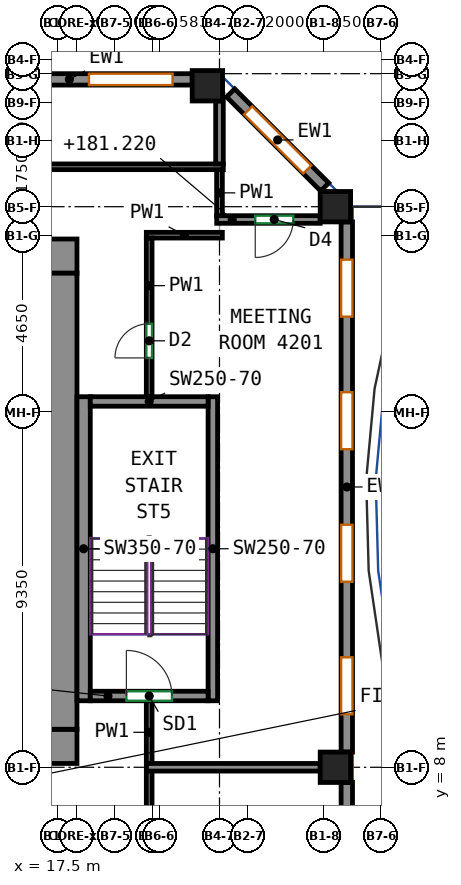
"""IFC4 building model, lengths in metres.
Left out: names, types, materials, properties, quantities, classifications, styles, units other than length and angle.
Written with IfcOpenShell. Run it as: python <this file> out.ifc"""

import sys

from ifc_helpers import new_model, si_unit, direction, frame, frame_2d, origin, origin_2d, place, context, subcontext, project, spatial, rectangle, extrude, source, transform, mapped, element, fill, save


model = new_model("IFC4")
c1 = context("Model", 3, precision=1e-05, world=origin(), true_north=direction((0.0, 1.0)))
c2 = subcontext(c1, "Body", "Model", "MODEL_VIEW")
j1 = project(units=[si_unit("LENGTHUNIT", "METRE"), si_unit("PLANEANGLEUNIT", "RADIAN")], contexts=[c1])
p1 = place(None, origin())
s1 = spatial("IfcSite", under=j1, at=p1, CompositionType="ELEMENT")
p2 = place(p1, origin())
s2 = spatial("IfcBuilding", under=s1, at=p2, CompositionType="ELEMENT")
p3 = place(p2, frame((0.0, 0.0, 178.7)))
s3 = spatial("IfcBuildingStorey", under=s2, at=p3, CompositionType="ELEMENT", Elevation=178.7)
m1 = source(origin(), c2, "Body", "SweptSolid", [
    extrude(rectangle(XDim=0.8, YDim=0.8, at=origin_2d()), origin(), (0.0, 0.0, 1.0), 3.12),
])
for number, where, z_axis, x_axis in (
    (1, (21.432, 25.932, 0.0), (0.0, 0.0, 1.0), (1.0, 0.0, 0.0)),
    (2, (24.8, 8.0, 0.0), (0.0, 0.0, 1.0), (1.0, 0.0, 0.0)),
    (3, (24.8, 22.75, 0.0), (0.0, 0.0, 1.0), (1.0, 0.0, 0.0)),
):
    element("IfcColumn", number, at=place(p3, frame(where, z_axis=z_axis, x_axis=x_axis)), inside=s3, PredefinedType="COLUMN", context=c2, shape_type="MappedRepresentation", body=[
        mapped(m1, transform((0.0, 0.0, 0.0))),
    ])
m2 = source(origin(), c2, "Body", "SweptSolid", [
    extrude(rectangle(XDim=5.53, YDim=0.9, at=frame_2d((2.765, 0.0))), origin(), (0.0, 0.0, 1.0), 3.12),
])
p4 = place(p3, frame((12.47, 8.55, 0.0), z_axis=(0.0, 0.0, 1.0), x_axis=(1.0, 0.0, 0.0)))
e4 = element("IfcWall", 4, at=p4, inside=s3, PredefinedType="SHEAR", context=c2, shape_type="MappedRepresentation", body=[
    mapped(m2, transform((0.0, 0.0, 0.0))),
])
p5 = place(p4, frame((2.18, 0.0, 0.0)))
e5 = element("IfcOpeningElement", 5, at=p5, cuts=e4, PredefinedType="OPENING", context=c2, shape_type="SweptSolid", body=[
    extrude(rectangle(XDim=1.2, YDim=2.1, at=frame_2d((0.6, 1.05))), frame((0.0, 0.46, 0.0), z_axis=(0.0, -1.0, 0.0), x_axis=(1.0, 0.0, 0.0)), (0.0, 0.0, 1.0), 0.92),
])
m3 = source(origin(), c2, "Body", "SweptSolid", [
    extrude(rectangle(XDim=33.9, YDim=0.9, at=frame_2d((16.95, 0.0))), origin(), (0.0, 0.0, 1.0), 3.12),
])
p6 = place(p3, frame((-15.9, 21.45, 0.0), z_axis=(0.0, 0.0, 1.0), x_axis=(1.0, 0.0, 0.0)))
e6 = element("IfcWall", 6, at=p6, inside=s3, PredefinedType="SHEAR", context=c2, shape_type="MappedRepresentation", body=[
    mapped(m3, transform((0.0, 0.0, 0.0))),
])
p7 = place(p6, frame((8.42, 0.0, 0.0)))
e7 = element("IfcOpeningElement", 7, at=p7, cuts=e6, PredefinedType="OPENING", context=c2, shape_type="SweptSolid", body=[
    extrude(rectangle(XDim=0.9, YDim=2.1, at=frame_2d((0.45, 1.05))), frame((0.0, 0.46, 0.0), z_axis=(0.0, -1.0, 0.0), x_axis=(1.0, 0.0, 0.0)), (0.0, 0.0, 1.0), 0.92),
])
p8 = place(p6, frame((15.12, 0.0, 0.0)))
e8 = element("IfcOpeningElement", 8, at=p8, cuts=e6, PredefinedType="OPENING", context=c2, shape_type="SweptSolid", body=[
    extrude(rectangle(XDim=0.9, YDim=2.1, at=frame_2d((0.45, 1.05))), frame((0.0, 0.46, 0.0), z_axis=(0.0, -1.0, 0.0), x_axis=(1.0, 0.0, 0.0)), (0.0, 0.0, 1.0), 0.92),
])
p9 = place(p6, frame((19.944, 0.0, 0.0)))
e9 = element("IfcOpeningElement", 9, at=p9, cuts=e6, PredefinedType="OPENING", context=c2, shape_type="SweptSolid", body=[
    extrude(rectangle(XDim=0.9, YDim=2.1, at=frame_2d((0.45, 1.05))), frame((0.0, 0.46, 0.0), z_axis=(0.0, -1.0, 0.0), x_axis=(1.0, 0.0, 0.0)), (0.0, 0.0, 1.0), 0.92),
])
p10 = place(p6, frame((25.304, 0.0, 0.0)))
e10 = element("IfcOpeningElement", 10, at=p10, cuts=e6, PredefinedType="OPENING", context=c2, shape_type="SweptSolid", body=[
    extrude(rectangle(XDim=0.9, YDim=2.1, at=frame_2d((0.45, 1.05))), frame((0.0, 0.46, 0.0), z_axis=(0.0, -1.0, 0.0), x_axis=(1.0, 0.0, 0.0)), (0.0, 0.0, 1.0), 0.92),
])
p11 = place(p6, frame((2.425, 0.0, 0.0)))
e11 = element("IfcOpeningElement", 11, at=p11, cuts=e6, PredefinedType="OPENING", context=c2, shape_type="SweptSolid", body=[
    extrude(rectangle(XDim=0.9, YDim=2.1, at=frame_2d((0.45, 1.05))), frame((0.0, 0.46, 0.0), z_axis=(0.0, -1.0, 0.0), x_axis=(1.0, 0.0, 0.0)), (0.0, 0.0, 1.0), 0.92),
])
p12 = place(p6, frame((30.575, 0.0, 0.0)))
e12 = element("IfcOpeningElement", 12, at=p12, cuts=e6, PredefinedType="OPENING", context=c2, shape_type="SweptSolid", body=[
    extrude(rectangle(XDim=0.9, YDim=2.1, at=frame_2d((0.45, 1.05))), frame((0.0, 0.46, 0.0), z_axis=(0.0, -1.0, 0.0), x_axis=(1.0, 0.0, 0.0)), (0.0, 0.0, 1.0), 0.92),
])
m4 = source(origin(), c2, "Body", "SweptSolid", [
    extrude(rectangle(XDim=12.0, YDim=0.9, at=frame_2d((6.0, 0.0))), origin(), (0.0, 0.0, 1.0), 3.12),
])
p13 = place(p3, frame((17.55, 9.0, 0.0), z_axis=(0.0, 0.0, 1.0), x_axis=(0.0, 1.0, 0.0)))
e13 = element("IfcWall", 13, at=p13, inside=s3, PredefinedType="SHEAR", context=c2, shape_type="MappedRepresentation", body=[
    mapped(m4, transform((0.0, 0.0, 0.0))),
])
m5 = source(origin(), c2, "Body", "SweptSolid", [
    extrude(rectangle(XDim=8.0, YDim=0.35, at=frame_2d((4.0, 0.0))), origin(), (0.0, 0.0, 1.0), 3.12),
])
p14 = place(p3, frame((18.175, 9.75, 0.0), z_axis=(0.0, 0.0, 1.0), x_axis=(0.0, 1.0, 0.0)))
e14 = element("IfcWall", 14, at=p14, inside=s3, PredefinedType="SHEAR", context=c2, shape_type="MappedRepresentation", body=[
    mapped(m5, transform((0.0, 0.0, 0.0))),
])
m6 = source(origin(), c2, "Body", "SweptSolid", [
    extrude(rectangle(XDim=8.0, YDim=0.25, at=frame_2d((4.0, 0.0))), origin(), (0.0, 0.0, 1.0), 3.12),
])
p15 = place(p3, frame((21.575, 9.75, 0.0), z_axis=(0.0, 0.0, 1.0), x_axis=(0.0, 1.0, 0.0)))
e15 = element("IfcWall", 15, at=p15, inside=s3, PredefinedType="SHEAR", context=c2, shape_type="MappedRepresentation", body=[
    mapped(m6, transform((0.0, 0.0, 0.0))),
])
m7 = source(origin(), c2, "Body", "SweptSolid", [
    extrude(rectangle(XDim=3.1, YDim=0.25, at=frame_2d((1.55, 0.0))), origin(), (0.0, 0.0, 1.0), 3.12),
])
p16 = place(p3, frame((18.35, 9.875, 0.0), z_axis=(0.0, 0.0, 1.0), x_axis=(1.0, 0.0, 0.0)))
e16 = element("IfcWall", 16, at=p16, inside=s3, PredefinedType="SHEAR", context=c2, shape_type="MappedRepresentation", body=[
    mapped(m7, transform((0.0, 0.0, 0.0))),
])
p17 = place(p16, frame((0.95, 0.0, 0.0)))
e17 = element("IfcOpeningElement", 17, at=p17, cuts=e16, PredefinedType="OPENING", context=c2, shape_type="SweptSolid", body=[
    extrude(rectangle(XDim=1.2, YDim=2.1, at=frame_2d((0.6, 1.05))), frame((0.0, 0.135, 0.0), z_axis=(0.0, -1.0, 0.0), x_axis=(1.0, 0.0, 0.0)), (0.0, 0.0, 1.0), 0.27),
])
p18 = place(p3, frame((18.35, 17.625, 0.0), z_axis=(0.0, 0.0, 1.0), x_axis=(1.0, 0.0, 0.0)))
e18 = element("IfcWall", 18, at=p18, inside=s3, PredefinedType="SHEAR", context=c2, shape_type="MappedRepresentation", body=[
    mapped(m7, transform((0.0, 0.0, 0.0))),
])
m8 = source(origin(), c2, "Body", "SweptSolid", [
    extrude(rectangle(XDim=7.763, YDim=0.3, at=frame_2d((3.881, 0.0))), origin(), (0.0, 0.0, 1.0), 3.12),
])
p19 = place(p3, frame((25.1, -0.163, 0.0), z_axis=(0.0, 0.0, 1.0), x_axis=(0.0, 1.0, 0.0)))
e19 = element("IfcWall", 19, at=p19, inside=s3, PredefinedType="SOLIDWALL", context=c2, shape_type="MappedRepresentation", body=[
    mapped(m8, transform((0.0, 0.0, 0.0))),
])
p20 = place(p19, frame((1.75, 0.0, 0.85)))
e20 = element("IfcOpeningElement", 20, at=p20, cuts=e19, PredefinedType="OPENING", context=c2, shape_type="SweptSolid", body=[
    extrude(rectangle(XDim=1.5, YDim=1.95, at=frame_2d((0.75, 0.975))), frame((0.0, 0.16, 0.0), z_axis=(0.0, -1.0, 0.0), x_axis=(1.0, 0.0, 0.0)), (0.0, 0.0, 1.0), 0.32),
])
p21 = place(p19, frame((0.45, 0.0, 0.0)))
e21 = element("IfcOpeningElement", 21, at=p21, cuts=e19, PredefinedType="OPENING", context=c2, shape_type="SweptSolid", body=[
    extrude(rectangle(XDim=1.0, YDim=2.1, at=frame_2d((0.5, 1.05))), frame((0.0, 0.16, 0.0), z_axis=(0.0, -1.0, 0.0), x_axis=(1.0, 0.0, 0.0)), (0.0, 0.0, 1.0), 0.32),
])
p22 = place(p19, frame((5.631, 0.0, 0.85)))
e22 = element("IfcOpeningElement", 22, at=p22, cuts=e19, PredefinedType="OPENING", context=c2, shape_type="SweptSolid", body=[
    extrude(rectangle(XDim=1.5, YDim=1.95, at=frame_2d((0.75, 0.975))), frame((0.0, 0.16, 0.0), z_axis=(0.0, -1.0, 0.0), x_axis=(1.0, 0.0, 0.0)), (0.0, 0.0, 1.0), 0.32),
])
p23 = place(p19, frame((4.331, 0.0, 0.0)))
e23 = element("IfcOpeningElement", 23, at=p23, cuts=e19, PredefinedType="OPENING", context=c2, shape_type="SweptSolid", body=[
    extrude(rectangle(XDim=1.0, YDim=2.1, at=frame_2d((0.5, 1.05))), frame((0.0, 0.16, 0.0), z_axis=(0.0, -1.0, 0.0), x_axis=(1.0, 0.0, 0.0)), (0.0, 0.0, 1.0), 0.32),
])
m9 = source(origin(), c2, "Body", "SweptSolid", [
    extrude(rectangle(XDim=13.95, YDim=0.3, at=frame_2d((6.975, 0.0))), origin(), (0.0, 0.0, 1.0), 3.12),
])
p24 = place(p3, frame((25.1, 8.4, 0.0), z_axis=(0.0, 0.0, 1.0), x_axis=(0.0, 1.0, 0.0)))
e24 = element("IfcWall", 24, at=p24, inside=s3, PredefinedType="SOLIDWALL", context=c2, shape_type="MappedRepresentation", body=[
    mapped(m9, transform((0.0, 0.0, 0.0))),
])
p25 = place(p24, frame((0.994, 0.0, 0.85)))
e25 = element("IfcOpeningElement", 25, at=p25, cuts=e24, PredefinedType="OPENING", context=c2, shape_type="SweptSolid", body=[
    extrude(rectangle(XDim=1.5, YDim=1.95, at=frame_2d((0.75, 0.975))), frame((0.0, 0.16, 0.0), z_axis=(0.0, -1.0, 0.0), x_axis=(1.0, 0.0, 0.0)), (0.0, 0.0, 1.0), 0.32),
])
p26 = place(p24, frame((4.481, 0.0, 0.85)))
e26 = element("IfcOpeningElement", 26, at=p26, cuts=e24, PredefinedType="OPENING", context=c2, shape_type="SweptSolid", body=[
    extrude(rectangle(XDim=1.5, YDim=1.95, at=frame_2d((0.75, 0.975))), frame((0.0, 0.16, 0.0), z_axis=(0.0, -1.0, 0.0), x_axis=(1.0, 0.0, 0.0)), (0.0, 0.0, 1.0), 0.32),
])
p27 = place(p24, frame((7.969, 0.0, 0.85)))
e27 = element("IfcOpeningElement", 27, at=p27, cuts=e24, PredefinedType="OPENING", context=c2, shape_type="SweptSolid", body=[
    extrude(rectangle(XDim=1.5, YDim=1.95, at=frame_2d((0.75, 0.975))), frame((0.0, 0.16, 0.0), z_axis=(0.0, -1.0, 0.0), x_axis=(1.0, 0.0, 0.0)), (0.0, 0.0, 1.0), 0.32),
])
p28 = place(p24, frame((11.456, 0.0, 0.85)))
e28 = element("IfcOpeningElement", 28, at=p28, cuts=e24, PredefinedType="OPENING", context=c2, shape_type="SweptSolid", body=[
    extrude(rectangle(XDim=1.5, YDim=1.95, at=frame_2d((0.75, 0.975))), frame((0.0, 0.16, 0.0), z_axis=(0.0, -1.0, 0.0), x_axis=(1.0, 0.0, 0.0)), (0.0, 0.0, 1.0), 0.32),
])
m10 = source(origin(), c2, "Body", "SweptSolid", [
    extrude(rectangle(XDim=3.5, YDim=0.3, at=frame_2d((1.75, 0.0))), origin(), (0.0, 0.0, 1.0), 3.12),
])
p29 = place(p3, frame((24.519, 23.269, 0.0), z_axis=(0.0, 0.0, 1.0), x_axis=(-0.70707190453, 0.707141656123, 0.0)))
e29 = element("IfcWall", 29, at=p29, inside=s3, PredefinedType="SOLIDWALL", context=c2, shape_type="MappedRepresentation", body=[
    mapped(m10, transform((0.0, 0.0, 0.0))),
])
p30 = place(p29, frame((0.65, 0.0, 0.85)))
e30 = element("IfcOpeningElement", 30, at=p30, cuts=e29, PredefinedType="OPENING", context=c2, shape_type="SweptSolid", body=[
    extrude(rectangle(XDim=2.2, YDim=1.95, at=frame_2d((1.1, 0.975))), frame((0.0, 0.16, 0.0), z_axis=(0.0, -1.0, 0.0), x_axis=(1.0, 0.0, 0.0)), (0.0, 0.0, 1.0), 0.32),
])
m11 = source(origin(), c2, "Body", "SweptSolid", [
    extrude(rectangle(XDim=6.465, YDim=0.3, at=frame_2d((3.232, 0.0))), origin(), (0.0, 0.0, 1.0), 3.12),
])
p31 = place(p3, frame((21.032, 26.1, 0.0), z_axis=(0.0, 0.0, 1.0), x_axis=(-1.0, 0.0, 0.0)))
e31 = element("IfcWall", 31, at=p31, inside=s3, PredefinedType="SOLIDWALL", context=c2, shape_type="MappedRepresentation", body=[
    mapped(m11, transform((0.0, 0.0, 0.0))),
])
p32 = place(p31, frame((0.516, 0.0, 0.85)))
e32 = element("IfcOpeningElement", 32, at=p32, cuts=e31, PredefinedType="OPENING", context=c2, shape_type="SweptSolid", body=[
    extrude(rectangle(XDim=2.2, YDim=1.95, at=frame_2d((1.1, 0.975))), frame((0.0, 0.16, 0.0), z_axis=(0.0, -1.0, 0.0), x_axis=(1.0, 0.0, 0.0)), (0.0, 0.0, 1.0), 0.32),
])
p33 = place(p31, frame((3.749, 0.0, 0.85)))
e33 = element("IfcOpeningElement", 33, at=p33, cuts=e31, PredefinedType="OPENING", context=c2, shape_type="SweptSolid", body=[
    extrude(rectangle(XDim=2.2, YDim=1.95, at=frame_2d((1.1, 0.975))), frame((0.0, 0.16, 0.0), z_axis=(0.0, -1.0, 0.0), x_axis=(1.0, 0.0, 0.0)), (0.0, 0.0, 1.0), 0.32),
])
p34 = place(p3, frame((19.9, 3.809, 0.0), z_axis=(0.0, 0.0, 1.0), x_axis=(0.0, 1.0, 0.0)))
e34 = element("IfcWall", 34, at=p34, inside=s3, PredefinedType="PARTITIONING", context=c2, shape_type="SweptSolid", body=[
    extrude(rectangle(XDim=4.101, YDim=0.15, at=frame_2d((2.05, 0.0))), origin(), (0.0, 0.0, 1.0), 3.12),
])
p35 = place(p34, frame((1.4, 0.0, 0.0)))
e35 = element("IfcOpeningElement", 35, at=p35, cuts=e34, PredefinedType="OPENING", context=c2, shape_type="SweptSolid", body=[
    extrude(rectangle(XDim=0.9, YDim=2.1, at=frame_2d((0.45, 1.05))), frame((0.0, 0.085, 0.0), z_axis=(0.0, -1.0, 0.0), x_axis=(1.0, 0.0, 0.0)), (0.0, 0.0, 1.0), 0.17),
])
p36 = place(p3, frame((19.825, 22.0, 0.0), z_axis=(0.0, 0.0, 1.0), x_axis=(1.0, 0.0, 0.0)))
e36 = element("IfcWall", 36, at=p36, inside=s3, PredefinedType="PARTITIONING", context=c2, shape_type="SweptSolid", body=[
    extrude(rectangle(XDim=2.0, YDim=0.15, at=frame_2d((1.0, 0.0))), origin(), (0.0, 0.0, 1.0), 3.12),
])
p37 = place(p3, frame((19.9, 17.75, 0.0), z_axis=(0.0, 0.0, 1.0), x_axis=(0.0, 1.0, 0.0)))
e37 = element("IfcWall", 37, at=p37, inside=s3, PredefinedType="PARTITIONING", context=c2, shape_type="SweptSolid", body=[
    extrude(rectangle(XDim=4.175, YDim=0.15, at=frame_2d((2.087, 0.0))), origin(), (0.0, 0.0, 1.0), 3.12),
])
p38 = place(p37, frame((1.021, 0.0, 0.0)))
e38 = element("IfcOpeningElement", 38, at=p38, cuts=e37, PredefinedType="OPENING", context=c2, shape_type="SweptSolid", body=[
    extrude(rectangle(XDim=0.9, YDim=2.1, at=frame_2d((0.45, 1.05))), frame((0.0, 0.085, 0.0), z_axis=(0.0, -1.0, 0.0), x_axis=(1.0, 0.0, 0.0)), (0.0, 0.0, 1.0), 0.17),
])
p39 = place(p3, frame((19.9, 8.09, 0.0), z_axis=(0.0, 0.0, 1.0), x_axis=(0.0, 1.0, 0.0)))
e39 = element("IfcWall", 39, at=p39, inside=s3, PredefinedType="PARTITIONING", context=c2, shape_type="SweptSolid", body=[
    extrude(rectangle(XDim=1.66, YDim=0.15, at=frame_2d((0.83, 0.0))), origin(), (0.0, 0.0, 1.0), 3.12),
])
p40 = place(p3, frame((21.75, 22.503, 0.0), z_axis=(0.0, 0.0, 1.0), x_axis=(0.0, 1.0, 0.0)))
e40 = element("IfcWall", 40, at=p40, inside=s3, PredefinedType="PARTITIONING", context=c2, shape_type="SweptSolid", body=[
    extrude(rectangle(XDim=1.222, YDim=0.15, at=frame_2d((0.611, 0.0))), origin(), (0.0, 0.0, 1.0), 3.12),
])
p41 = place(p3, frame((21.85, 23.8, 0.0), z_axis=(0.0, 0.0, 1.0), x_axis=(-1.0, 0.0, 0.0)))
e41 = element("IfcWall", 41, at=p41, inside=s3, PredefinedType="PARTITIONING", context=c2, shape_type="SweptSolid", body=[
    extrude(rectangle(XDim=41.909, YDim=0.15, at=frame_2d((20.955, 0.0))), origin(), (0.0, 0.0, 1.0), 3.12),
])
p42 = place(p41, frame((29.607, 0.0, 0.0)))
e42 = element("IfcOpeningElement", 42, at=p42, cuts=e41, PredefinedType="OPENING", context=c2, shape_type="SweptSolid", body=[
    extrude(rectangle(XDim=1.0, YDim=2.1, at=frame_2d((0.5, 1.05))), frame((0.0, 0.085, 0.0), z_axis=(0.0, -1.0, 0.0), x_axis=(1.0, 0.0, 0.0)), (0.0, 0.0, 1.0), 0.17),
])
p43 = place(p3, frame((19.827, 8.0, 0.0), z_axis=(0.0, 0.0, 1.0), x_axis=(1.0, 0.0, 0.0)))
e43 = element("IfcWall", 43, at=p43, inside=s3, PredefinedType="PARTITIONING", context=c2, shape_type="SweptSolid", body=[
    extrude(rectangle(XDim=4.573, YDim=0.2, at=frame_2d((2.287, 0.0))), origin(), (0.0, 0.0, 1.0), 3.12),
])
p44 = place(p3, frame((24.4, 22.413, 0.0), z_axis=(0.0, 0.0, 1.0), x_axis=(-1.0, 0.0, 0.0)))
e44 = element("IfcWall", 44, at=p44, inside=s3, PredefinedType="PARTITIONING", context=c2, shape_type="SweptSolid", body=[
    extrude(rectangle(XDim=2.723, YDim=0.2, at=frame_2d((1.361, 0.0))), origin(), (0.0, 0.0, 1.0), 2.52),
])
p45 = place(p44, frame((0.709, 0.0, 0.0)))
e45 = element("IfcOpeningElement", 45, at=p45, cuts=e44, PredefinedType="OPENING", context=c2, shape_type="SweptSolid", body=[
    extrude(rectangle(XDim=1.0, YDim=2.1, at=frame_2d((0.5, 1.05))), frame((0.0, 0.11, 0.0), z_axis=(0.0, -1.0, 0.0), x_axis=(1.0, 0.0, 0.0)), (0.0, 0.0, 1.0), 0.22),
])
p46 = place(p3, frame((21.75, 25.532, 0.0), z_axis=(0.0, 0.0, 1.0), x_axis=(0.0, -1.0, 0.0)))
e46 = element("IfcWall", 46, at=p46, inside=s3, PredefinedType="PARTITIONING", context=c2, shape_type="SweptSolid", body=[
    extrude(rectangle(XDim=1.655, YDim=0.2, at=frame_2d((0.828, 0.0))), origin(), (0.0, 0.0, 1.0), 3.12),
])
p47 = place(p25, origin())
e47 = element("IfcWindow", 47, at=p47, inside=s3, PartitioningType="SINGLE_PANEL", PredefinedType="WINDOW", context=c2, shape_type="SweptSolid", body=[
    extrude(rectangle(XDim=1.5, YDim=1.95, at=frame_2d((0.75, 0.975))), frame((0.0, 0.03, 0.0), z_axis=(0.0, -1.0, 0.0), x_axis=(1.0, 0.0, 0.0)), (0.0, 0.0, 1.0), 0.06),
])
fill(e25, e47)
p48 = place(p26, origin())
e48 = element("IfcWindow", 48, at=p48, inside=s3, PartitioningType="SINGLE_PANEL", PredefinedType="WINDOW", context=c2, shape_type="SweptSolid", body=[
    extrude(rectangle(XDim=1.5, YDim=1.95, at=frame_2d((0.75, 0.975))), frame((0.0, 0.03, 0.0), z_axis=(0.0, -1.0, 0.0), x_axis=(1.0, 0.0, 0.0)), (0.0, 0.0, 1.0), 0.06),
])
fill(e26, e48)
p49 = place(p27, origin())
e49 = element("IfcWindow", 49, at=p49, inside=s3, PartitioningType="SINGLE_PANEL", PredefinedType="WINDOW", context=c2, shape_type="SweptSolid", body=[
    extrude(rectangle(XDim=1.5, YDim=1.95, at=frame_2d((0.75, 0.975))), frame((0.0, 0.03, 0.0), z_axis=(0.0, -1.0, 0.0), x_axis=(1.0, 0.0, 0.0)), (0.0, 0.0, 1.0), 0.06),
])
fill(e27, e49)
p50 = place(p28, origin())
e50 = element("IfcWindow", 50, at=p50, inside=s3, PartitioningType="SINGLE_PANEL", PredefinedType="WINDOW", context=c2, shape_type="SweptSolid", body=[
    extrude(rectangle(XDim=1.5, YDim=1.95, at=frame_2d((0.75, 0.975))), frame((0.0, 0.03, 0.0), z_axis=(0.0, -1.0, 0.0), x_axis=(1.0, 0.0, 0.0)), (0.0, 0.0, 1.0), 0.06),
])
fill(e28, e50)
p51 = place(p30, origin())
e51 = element("IfcWindow", 51, at=p51, inside=s3, PartitioningType="SINGLE_PANEL", PredefinedType="WINDOW", context=c2, shape_type="SweptSolid", body=[
    extrude(rectangle(XDim=2.2, YDim=1.95, at=frame_2d((1.1, 0.975))), frame((0.0, 0.03, 0.0), z_axis=(0.0, -1.0, 0.0), x_axis=(1.0, 0.0, 0.0)), (0.0, 0.0, 1.0), 0.06),
])
fill(e30, e51)
p52 = place(p32, origin())
e52 = element("IfcWindow", 52, at=p52, inside=s3, PartitioningType="SINGLE_PANEL", PredefinedType="WINDOW", context=c2, shape_type="SweptSolid", body=[
    extrude(rectangle(XDim=2.2, YDim=1.95, at=frame_2d((1.1, 0.975))), frame((0.0, 0.03, 0.0), z_axis=(0.0, -1.0, 0.0), x_axis=(1.0, 0.0, 0.0)), (0.0, 0.0, 1.0), 0.06),
])
fill(e32, e52)
p53 = place(p17, origin())
e53 = element("IfcDoor", 53, at=p53, inside=s3, OperationType="DOUBLE_DOOR_SINGLE_SWING", PredefinedType="DOOR", context=c2, shape_type="SweptSolid", body=[
    extrude(rectangle(XDim=1.2, YDim=2.1, at=frame_2d((0.6, 1.05))), frame((0.0, 0.025, 0.0), z_axis=(0.0, -1.0, 0.0), x_axis=(1.0, 0.0, 0.0)), (0.0, 0.0, 1.0), 0.05),
])
fill(e17, e53)
p54 = place(p38, origin())
e54 = element("IfcDoor", 54, at=p54, inside=s3, OperationType="SINGLE_SWING_LEFT", PredefinedType="DOOR", context=c2, shape_type="SweptSolid", body=[
    extrude(rectangle(XDim=0.9, YDim=2.1, at=frame_2d((0.45, 1.05))), frame((0.0, 0.025, 0.0), z_axis=(0.0, -1.0, 0.0), x_axis=(1.0, 0.0, 0.0)), (0.0, 0.0, 1.0), 0.05),
])
fill(e38, e54)
p55 = place(p45, origin())
e55 = element("IfcDoor", 55, at=p55, inside=s3, OperationType="SINGLE_SWING_RIGHT", PredefinedType="DOOR", context=c2, shape_type="SweptSolid", body=[
    extrude(rectangle(XDim=1.0, YDim=2.1, at=frame_2d((0.5, 1.05))), frame((0.0, 0.025, 0.0), z_axis=(0.0, -1.0, 0.0), x_axis=(1.0, 0.0, 0.0)), (0.0, 0.0, 1.0), 0.05),
])
fill(e45, e55)
save(model, sys.argv[1])
